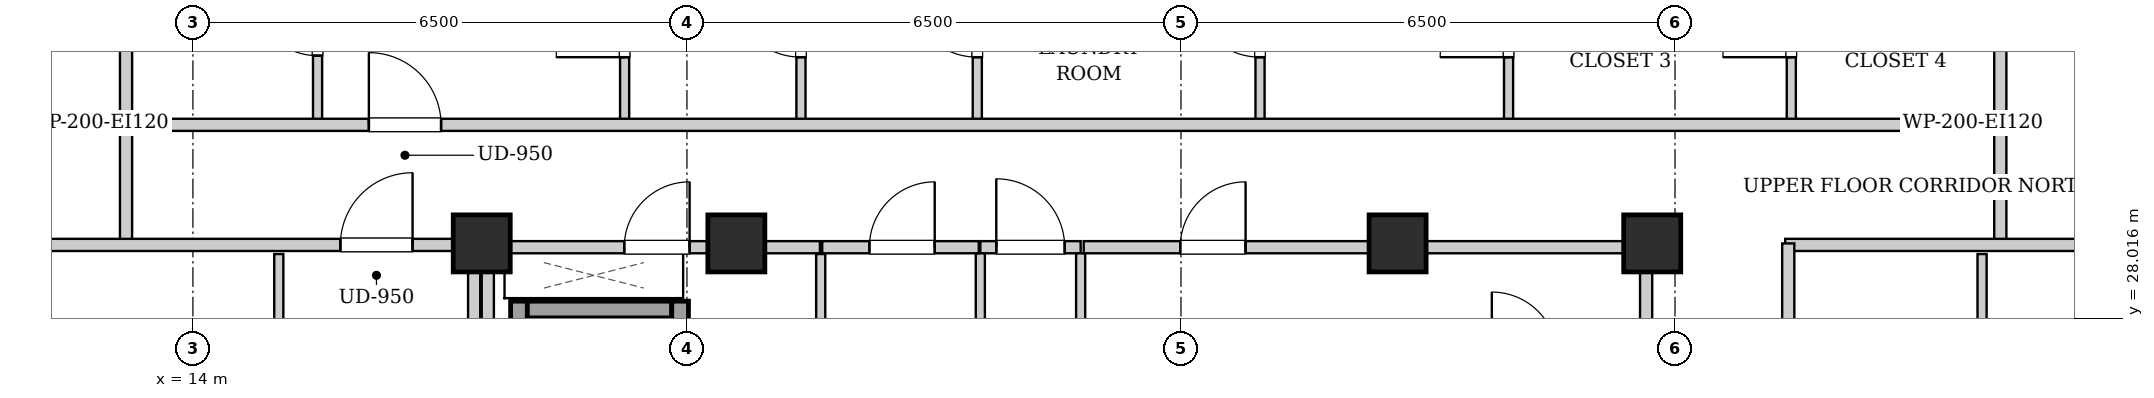
"""IFC4 building model, lengths in metres.
Left out: names, types, materials, properties, quantities, classifications, styles, units other than length and angle.
Written with IfcOpenShell. Run it as: python <this file> out.ifc"""

import sys

from ifc_helpers import new_model, si_unit, direction, frame, frame_2d, origin, origin_2d, place, context, subcontext, project, spatial, rectangle, extrude, element, fill, save


model = new_model("IFC4")
c1 = context("Model", 3, precision=1e-05, world=origin(), true_north=direction((0.0, 1.0)))
c2 = subcontext(c1, "Body", "Model", "MODEL_VIEW")
j1 = project(units=[si_unit("LENGTHUNIT", "METRE"), si_unit("PLANEANGLEUNIT", "RADIAN")], contexts=[c1])
p1 = place(None, origin())
s1 = spatial("IfcSite", under=j1, at=p1, CompositionType="ELEMENT")
p2 = place(p1, origin())
s2 = spatial("IfcBuilding", under=s1, at=p2, CompositionType="ELEMENT")
p3 = place(p2, frame((0.0, 0.0, 241.1)))
s3 = spatial("IfcBuildingStorey", under=s2, at=p3, CompositionType="ELEMENT", Elevation=241.1)
for number, where, z_axis, x_axis in (
    (1, (17.8, 29.0, 0.0), (0.0, 0.0, 1.0), (1.0, 0.0, 0.0)),
    (2, (21.15, 29.0, 0.0), (0.0, 0.0, 1.0), (1.0, 0.0, 0.0)),
    (3, (29.85, 29.0, 0.0), (0.0, 0.0, 1.0), (1.0, 0.0, 0.0)),
    (4, (33.2, 29.0, 0.0), (0.0, 0.0, 1.0), (1.0, 0.0, 0.0)),
):
    element("IfcColumn", number, at=place(p3, frame(where, z_axis=z_axis, x_axis=x_axis)), inside=s3, PredefinedType="COLUMN", context=c2, shape_type="SweptSolid", body=[
        extrude(rectangle(XDim=0.75, YDim=0.75, at=origin_2d()), origin(), (0.0, 0.0, 1.0), 3.4),
    ])
p4 = place(p3, frame((18.29, 24.1, 0.0), z_axis=(0.0, 0.0, 1.0), x_axis=(0.0, 1.0, 0.0)))
e5 = element("IfcWall", 5, at=p4, inside=s3, PredefinedType="SHEAR", context=c2, shape_type="SweptSolid", body=[
    extrude(rectangle(XDim=4.14, YDim=0.22, at=frame_2d((2.07, 0.0))), origin(), (0.0, 0.0, 1.0), 3.14),
])
p5 = place(p3, frame((18.4, 28.13, 0.0), z_axis=(0.0, 0.0, 1.0), x_axis=(1.0, 0.0, 0.0)))
e6 = element("IfcWall", 6, at=p5, inside=s3, PredefinedType="SHEAR", context=c2, shape_type="SweptSolid", body=[
    extrude(rectangle(XDim=1.9, YDim=0.22, at=frame_2d((0.95, 0.0))), origin(), (0.0, 0.0, 1.0), 3.14),
])
p6 = place(p3, frame((20.41, 26.06, 0.0), z_axis=(0.0, 0.0, 1.0), x_axis=(0.0, 1.0, 0.0)))
e7 = element("IfcWall", 7, at=p6, inside=s3, PredefinedType="SHEAR", context=c2, shape_type="SweptSolid", body=[
    extrude(rectangle(XDim=2.18, YDim=0.22, at=frame_2d((1.09, 0.0))), origin(), (0.0, 0.0, 1.0), 3.14),
])
p7 = place(p6, frame((0.54, 0.0, 0.0)))
e8 = element("IfcOpeningElement", 8, at=p7, cuts=e7, PredefinedType="OPENING", context=c2, shape_type="SweptSolid", body=[
    extrude(rectangle(XDim=1.1, YDim=2.15, at=frame_2d((0.55, 1.075))), frame((0.0, 0.12, 0.0), z_axis=(0.0, -1.0, 0.0), x_axis=(1.0, 0.0, 0.0)), (0.0, 0.0, 1.0), 0.24),
])
for number, where, z_axis, x_axis in (
    (9, (17.88, 24.12, 0.0), (0.0, 0.0, 1.0), (0.0, 1.0, 0.0)),
    (10, (33.12, 24.12, 0.0), (0.0, 0.0, 1.0), (0.0, 1.0, 0.0)),
):
    element("IfcWall", number, at=place(p3, frame(where, z_axis=z_axis, x_axis=x_axis)), inside=s3, PredefinedType="PARTITIONING", context=c2, shape_type="SweptSolid", body=[
        extrude(rectangle(XDim=4.76, YDim=0.16, at=frame_2d((2.38, 0.0))), origin(), (0.0, 0.0, 1.0), 3.14),
    ])
p8 = place(p3, frame((24.36, 28.95, 0.0), z_axis=(0.0, 0.0, 1.0), x_axis=(1.0, 0.0, 0.0)))
e11 = element("IfcWall", 11, at=p8, inside=s3, PredefinedType="PARTITIONING", context=c2, shape_type="SweptSolid", body=[
    extrude(rectangle(XDim=1.32, YDim=0.16, at=frame_2d((0.66, 0.0))), origin(), (0.0, 0.0, 1.0), 2.668),
])
p9 = place(p8, frame((0.21, 0.0, 0.0)))
e12 = element("IfcOpeningElement", 12, at=p9, cuts=e11, PredefinedType="OPENING", context=c2, shape_type="SweptSolid", body=[
    extrude(rectangle(XDim=0.9, YDim=2.05, at=frame_2d((0.45, 1.025))), frame((0.0, 0.09, 0.0), z_axis=(0.0, -1.0, 0.0), x_axis=(1.0, 0.0, 0.0)), (0.0, 0.0, 1.0), 0.18),
])
p10 = place(p3, frame((17.96, 28.95, 0.0), z_axis=(0.0, 0.0, 1.0), x_axis=(1.0, 0.0, 0.0)))
e13 = element("IfcWall", 13, at=p10, inside=s3, PredefinedType="PARTITIONING", context=c2, shape_type="SweptSolid", body=[
    extrude(rectangle(XDim=4.29, YDim=0.16, at=frame_2d((2.145, 0.0))), origin(), (0.0, 0.0, 1.0), 2.668),
])
p11 = place(p10, frame((1.715, 0.0, 0.0)))
e14 = element("IfcOpeningElement", 14, at=p11, cuts=e13, PredefinedType="OPENING", context=c2, shape_type="SweptSolid", body=[
    extrude(rectangle(XDim=0.86, YDim=2.05, at=frame_2d((0.43, 1.025))), frame((0.0, 0.09, 0.0), z_axis=(0.0, -1.0, 0.0), x_axis=(1.0, 0.0, 0.0)), (0.0, 0.0, 1.0), 0.18),
])
for number, where, z_axis, x_axis in (
    (15, (24.36, 25.0, 0.0), (0.0, 0.0, 1.0), (0.0, 1.0, 0.0)),
    (16, (25.68, 25.0, 0.0), (0.0, 0.0, 1.0), (0.0, 1.0, 0.0)),
):
    element("IfcWall", number, at=place(p3, frame(where, z_axis=z_axis, x_axis=x_axis)), inside=s3, PredefinedType="PARTITIONING", context=c2, shape_type="SweptSolid", body=[
        extrude(rectangle(XDim=3.87, YDim=0.12, at=frame_2d((1.935, 0.0))), origin(), (0.0, 0.0, 1.0), 3.14),
    ])
p12 = place(p3, frame((22.26, 25.0, 0.0), z_axis=(0.0, 0.0, 1.0), x_axis=(0.0, 1.0, 0.0)))
e17 = element("IfcWall", 17, at=p12, inside=s3, PredefinedType="PARTITIONING", context=c2, shape_type="SweptSolid", body=[
    extrude(rectangle(XDim=3.86, YDim=0.12, at=frame_2d((1.93, 0.0))), origin(), (0.0, 0.0, 1.0), 3.14),
])
p13 = place(p3, frame((22.28, 28.95, 0.0), z_axis=(0.0, 0.0, 1.0), x_axis=(1.0, 0.0, 0.0)))
e18 = element("IfcWall", 18, at=p13, inside=s3, PredefinedType="PARTITIONING", context=c2, shape_type="SweptSolid", body=[
    extrude(rectangle(XDim=2.06, YDim=0.16, at=frame_2d((1.03, 0.0))), origin(), (0.0, 0.0, 1.0), 2.668),
])
p14 = place(p13, frame((0.62, 0.0, 0.0)))
e19 = element("IfcOpeningElement", 19, at=p14, cuts=e18, PredefinedType="OPENING", context=c2, shape_type="SweptSolid", body=[
    extrude(rectangle(XDim=0.86, YDim=2.05, at=frame_2d((0.43, 1.025))), frame((0.0, 0.09, 0.0), z_axis=(0.0, -1.0, 0.0), x_axis=(1.0, 0.0, 0.0)), (0.0, 0.0, 1.0), 0.18),
])
p15 = place(p3, frame((25.72, 28.95, 0.0), z_axis=(0.0, 0.0, 1.0), x_axis=(1.0, 0.0, 0.0)))
e20 = element("IfcWall", 20, at=p15, inside=s3, PredefinedType="PARTITIONING", context=c2, shape_type="SweptSolid", body=[
    extrude(rectangle(XDim=7.32, YDim=0.16, at=frame_2d((3.66, 0.0))), origin(), (0.0, 0.0, 1.0), 2.668),
])
p16 = place(p15, frame((1.27, 0.0, 0.0)))
e21 = element("IfcOpeningElement", 21, at=p16, cuts=e20, PredefinedType="OPENING", context=c2, shape_type="SweptSolid", body=[
    extrude(rectangle(XDim=0.86, YDim=2.05, at=frame_2d((0.43, 1.025))), frame((0.0, 0.09, 0.0), z_axis=(0.0, -1.0, 0.0), x_axis=(1.0, 0.0, 0.0)), (0.0, 0.0, 1.0), 0.18),
])
for number, where, z_axis, x_axis in (
    (22, (13.12, 28.98, 0.0), (0.0, 0.0, 1.0), (0.0, 1.0, 0.0)),
    (23, (37.78, 28.98, 0.0), (0.0, 0.0, 1.0), (0.0, 1.0, 0.0)),
):
    element("IfcWall", number, at=place(p3, frame(where, z_axis=z_axis, x_axis=x_axis)), inside=s3, PredefinedType="PARTITIONING", context=c2, shape_type="SweptSolid", body=[
        extrude(rectangle(XDim=1.58, YDim=0.16, at=frame_2d((0.79, 0.0))), origin(), (0.0, 0.0, 1.0), 3.14),
    ])
p17 = place(p3, frame((34.95, 28.98, 0.0), z_axis=(0.0, 0.0, 1.0), x_axis=(1.0, 0.0, 0.0)))
e24 = element("IfcWall", 24, at=p17, inside=s3, PredefinedType="PARTITIONING", context=c2, shape_type="SweptSolid", body=[
    extrude(rectangle(XDim=5.07, YDim=0.16, at=frame_2d((2.535, 0.0))), origin(), (0.0, 0.0, 1.0), 2.668),
])
for number, where, z_axis, x_axis in (
    (25, (13.12, 30.6, 0.0), (0.0, 0.0, 1.0), (0.0, 1.0, 0.0)),
    (26, (37.78, 30.6, 0.0), (0.0, 0.0, 1.0), (0.0, 1.0, 0.0)),
):
    element("IfcWall", number, at=place(p3, frame(where, z_axis=z_axis, x_axis=x_axis)), inside=s3, PredefinedType="PARTITIONING", context=c2, shape_type="SweptSolid", body=[
        extrude(rectangle(XDim=2.66, YDim=0.16, at=frame_2d((1.33, 0.0))), origin(), (0.0, 0.0, 1.0), 3.14),
    ])
p18 = place(p3, frame((15.64, 30.6, 0.0), z_axis=(0.0, 0.0, 1.0), x_axis=(0.0, 1.0, 0.0)))
e27 = element("IfcWall", 27, at=p18, inside=s3, PredefinedType="PARTITIONING", context=c2, shape_type="SweptSolid", body=[
    extrude(rectangle(XDim=2.6, YDim=0.12, at=frame_2d((1.3, 0.0))), origin(), (0.0, 0.0, 1.0), 3.14),
])
p19 = place(p18, frame((0.87, 0.0, 0.0)))
e28 = element("IfcOpeningElement", 28, at=p19, cuts=e27, PredefinedType="OPENING", context=c2, shape_type="SweptSolid", body=[
    extrude(rectangle(XDim=0.86, YDim=2.05, at=frame_2d((0.43, 1.025))), frame((0.0, 0.07, 0.0), z_axis=(0.0, -1.0, 0.0), x_axis=(1.0, 0.0, 0.0)), (0.0, 0.0, 1.0), 0.14),
])
p20 = place(p3, frame((19.68, 30.6, 0.0), z_axis=(0.0, 0.0, 1.0), x_axis=(0.0, 1.0, 0.0)))
e29 = element("IfcWall", 29, at=p20, inside=s3, PredefinedType="PARTITIONING", context=c2, shape_type="SweptSolid", body=[
    extrude(rectangle(XDim=2.6, YDim=0.12, at=frame_2d((1.3, 0.0))), origin(), (0.0, 0.0, 1.0), 3.14),
])
p21 = place(p20, frame((0.85, 0.0, 0.0)))
e30 = element("IfcOpeningElement", 30, at=p21, cuts=e29, PredefinedType="OPENING", context=c2, shape_type="SweptSolid", body=[
    extrude(rectangle(XDim=0.9, YDim=2.05, at=frame_2d((0.45, 1.025))), frame((0.0, 0.07, 0.0), z_axis=(0.0, -1.0, 0.0), x_axis=(1.0, 0.0, 0.0)), (0.0, 0.0, 1.0), 0.14),
])
p22 = place(p3, frame((22.0, 30.6, 0.0), z_axis=(0.0, 0.0, 1.0), x_axis=(0.0, 1.0, 0.0)))
e31 = element("IfcWall", 31, at=p22, inside=s3, PredefinedType="PARTITIONING", context=c2, shape_type="SweptSolid", body=[
    extrude(rectangle(XDim=2.6, YDim=0.12, at=frame_2d((1.3, 0.0))), origin(), (0.0, 0.0, 1.0), 3.14),
])
p23 = place(p22, frame((0.85, 0.0, 0.0)))
e32 = element("IfcOpeningElement", 32, at=p23, cuts=e31, PredefinedType="OPENING", context=c2, shape_type="SweptSolid", body=[
    extrude(rectangle(XDim=0.9, YDim=2.05, at=frame_2d((0.45, 1.025))), frame((0.0, 0.07, 0.0), z_axis=(0.0, -1.0, 0.0), x_axis=(1.0, 0.0, 0.0)), (0.0, 0.0, 1.0), 0.14),
])
p24 = place(p3, frame((24.32, 30.6, 0.0), z_axis=(0.0, 0.0, 1.0), x_axis=(0.0, 1.0, 0.0)))
e33 = element("IfcWall", 33, at=p24, inside=s3, PredefinedType="PARTITIONING", context=c2, shape_type="SweptSolid", body=[
    extrude(rectangle(XDim=2.6, YDim=0.12, at=frame_2d((1.3, 0.0))), origin(), (0.0, 0.0, 1.0), 3.14),
])
p25 = place(p24, frame((0.85, 0.0, 0.0)))
e34 = element("IfcOpeningElement", 34, at=p25, cuts=e33, PredefinedType="OPENING", context=c2, shape_type="SweptSolid", body=[
    extrude(rectangle(XDim=0.9, YDim=2.05, at=frame_2d((0.45, 1.025))), frame((0.0, 0.07, 0.0), z_axis=(0.0, -1.0, 0.0), x_axis=(1.0, 0.0, 0.0)), (0.0, 0.0, 1.0), 0.14),
])
p26 = place(p3, frame((28.04, 30.6, 0.0), z_axis=(0.0, 0.0, 1.0), x_axis=(0.0, 1.0, 0.0)))
e35 = element("IfcWall", 35, at=p26, inside=s3, PredefinedType="PARTITIONING", context=c2, shape_type="SweptSolid", body=[
    extrude(rectangle(XDim=2.6, YDim=0.12, at=frame_2d((1.3, 0.0))), origin(), (0.0, 0.0, 1.0), 3.14),
])
p27 = place(p26, frame((0.85, 0.0, 0.0)))
e36 = element("IfcOpeningElement", 36, at=p27, cuts=e35, PredefinedType="OPENING", context=c2, shape_type="SweptSolid", body=[
    extrude(rectangle(XDim=0.9, YDim=2.05, at=frame_2d((0.45, 1.025))), frame((0.0, 0.07, 0.0), z_axis=(0.0, -1.0, 0.0), x_axis=(1.0, 0.0, 0.0)), (0.0, 0.0, 1.0), 0.14),
])
p28 = place(p3, frame((31.31, 30.6, 0.0), z_axis=(0.0, 0.0, 1.0), x_axis=(0.0, 1.0, 0.0)))
e37 = element("IfcWall", 37, at=p28, inside=s3, PredefinedType="PARTITIONING", context=c2, shape_type="SweptSolid", body=[
    extrude(rectangle(XDim=2.6, YDim=0.12, at=frame_2d((1.3, 0.0))), origin(), (0.0, 0.0, 1.0), 3.14),
])
p29 = place(p28, frame((0.85, 0.0, 0.0)))
e38 = element("IfcOpeningElement", 38, at=p29, cuts=e37, PredefinedType="OPENING", context=c2, shape_type="SweptSolid", body=[
    extrude(rectangle(XDim=0.9, YDim=2.05, at=frame_2d((0.45, 1.025))), frame((0.0, 0.07, 0.0), z_axis=(0.0, -1.0, 0.0), x_axis=(1.0, 0.0, 0.0)), (0.0, 0.0, 1.0), 0.14),
])
p30 = place(p3, frame((35.03, 30.6, 0.0), z_axis=(0.0, 0.0, 1.0), x_axis=(0.0, 1.0, 0.0)))
e39 = element("IfcWall", 39, at=p30, inside=s3, PredefinedType="PARTITIONING", context=c2, shape_type="SweptSolid", body=[
    extrude(rectangle(XDim=2.6, YDim=0.12, at=frame_2d((1.3, 0.0))), origin(), (0.0, 0.0, 1.0), 3.14),
])
p31 = place(p30, frame((0.85, 0.0, 0.0)))
e40 = element("IfcOpeningElement", 40, at=p31, cuts=e39, PredefinedType="OPENING", context=c2, shape_type="SweptSolid", body=[
    extrude(rectangle(XDim=0.9, YDim=2.05, at=frame_2d((0.45, 1.025))), frame((0.0, 0.07, 0.0), z_axis=(0.0, -1.0, 0.0), x_axis=(1.0, 0.0, 0.0)), (0.0, 0.0, 1.0), 0.14),
])
p32 = place(p3, frame((10.88, 28.98, 0.0), z_axis=(0.0, 0.0, 1.0), x_axis=(1.0, 0.0, 0.0)))
e41 = element("IfcWall", 41, at=p32, inside=s3, PredefinedType="PARTITIONING", context=c2, shape_type="SweptSolid", body=[
    extrude(rectangle(XDim=6.88, YDim=0.16, at=frame_2d((3.44, 0.0))), origin(), (0.0, 0.0, 1.0), 2.668),
])
p33 = place(p32, frame((5.06, 0.0, 0.0)))
e42 = element("IfcOpeningElement", 42, at=p33, cuts=e41, PredefinedType="OPENING", context=c2, shape_type="SweptSolid", body=[
    extrude(rectangle(XDim=0.95, YDim=2.1, at=frame_2d((0.475, 1.05))), frame((0.0, 0.09, 0.0), z_axis=(0.0, -1.0, 0.0), x_axis=(1.0, 0.0, 0.0)), (0.0, 0.0, 1.0), 0.18),
])
p34 = place(p3, frame((15.13, 24.36, 0.0), z_axis=(0.0, 0.0, 1.0), x_axis=(0.0, 1.0, 0.0)))
e43 = element("IfcWall", 43, at=p34, inside=s3, PredefinedType="PARTITIONING", context=c2, shape_type="SweptSolid", body=[
    extrude(rectangle(XDim=4.5, YDim=0.12, at=frame_2d((2.25, 0.0))), origin(), (0.0, 0.0, 1.0), 3.14),
])
p35 = place(p34, frame((1.8, 0.0, 0.0)))
e44 = element("IfcOpeningElement", 44, at=p35, cuts=e43, PredefinedType="OPENING", context=c2, shape_type="SweptSolid", body=[
    extrude(rectangle(XDim=0.9, YDim=2.05, at=frame_2d((0.45, 1.025))), frame((0.0, 0.07, 0.0), z_axis=(0.0, -1.0, 0.0), x_axis=(1.0, 0.0, 0.0)), (0.0, 0.0, 1.0), 0.14),
])
p36 = place(p3, frame((37.54, 24.552, 0.0), z_axis=(0.0, 0.0, 1.0), x_axis=(0.0, 1.0, 0.0)))
e45 = element("IfcWall", 45, at=p36, inside=s3, PredefinedType="PARTITIONING", context=c2, shape_type="SweptSolid", body=[
    extrude(rectangle(XDim=4.308, YDim=0.12, at=frame_2d((2.154, 0.0))), origin(), (0.0, 0.0, 1.0), 3.14),
])
p37 = place(p36, frame((1.704, 0.0, 0.0)))
e46 = element("IfcOpeningElement", 46, at=p37, cuts=e45, PredefinedType="OPENING", context=c2, shape_type="SweptSolid", body=[
    extrude(rectangle(XDim=0.9, YDim=2.05, at=frame_2d((0.45, 1.025))), frame((0.0, 0.07, 0.0), z_axis=(0.0, -1.0, 0.0), x_axis=(1.0, 0.0, 0.0)), (0.0, 0.0, 1.0), 0.14),
])
p38 = place(p3, frame((13.15, 30.56, 0.0), z_axis=(0.0, 0.0, 1.0), x_axis=(1.0, 0.0, 0.0)))
e47 = element("IfcWall", 47, at=p38, inside=s3, PredefinedType="PARTITIONING", context=c2, shape_type="SweptSolid", body=[
    extrude(rectangle(XDim=24.6, YDim=0.16, at=frame_2d((12.3, 0.0))), origin(), (0.0, 0.0, 1.0), 3.14),
])
p39 = place(p38, frame((3.165, 0.0, 0.0)))
e48 = element("IfcOpeningElement", 48, at=p39, cuts=e47, PredefinedType="OPENING", context=c2, shape_type="SweptSolid", body=[
    extrude(rectangle(XDim=0.95, YDim=2.1, at=frame_2d((0.475, 1.05))), frame((0.0, 0.09, 0.0), z_axis=(0.0, -1.0, 0.0), x_axis=(1.0, 0.0, 0.0)), (0.0, 0.0, 1.0), 0.18),
])
p40 = place(p3, frame((17.7, 15.02, 0.0), z_axis=(0.0, 0.0, 1.0), x_axis=(0.0, 1.0, 0.0)))
e49 = element("IfcWall", 49, at=p40, inside=s3, PredefinedType="PARTITIONING", context=c2, shape_type="SweptSolid", body=[
    extrude(rectangle(XDim=13.98, YDim=0.16, at=frame_2d((6.99, 0.0))), origin(), (0.0, 0.0, 1.0), 3.14),
])
p41 = place(p3, frame((34.99, 15.07, 0.0), z_axis=(0.0, 0.0, 1.0), x_axis=(0.0, 1.0, 0.0)))
e50 = element("IfcWall", 50, at=p41, inside=s3, PredefinedType="PARTITIONING", context=c2, shape_type="SweptSolid", body=[
    extrude(rectangle(XDim=13.93, YDim=0.16, at=frame_2d((6.965, 0.0))), origin(), (0.0, 0.0, 1.0), 3.14),
])
p42 = place(p41, frame((4.385, 0.0, 0.0)))
e51 = element("IfcOpeningElement", 51, at=p42, cuts=e50, PredefinedType="OPENING", context=c2, shape_type="SweptSolid", body=[
    extrude(rectangle(XDim=0.95, YDim=2.1, at=frame_2d((0.475, 1.05))), frame((0.0, 0.09, 0.0), z_axis=(0.0, -1.0, 0.0), x_axis=(1.0, 0.0, 0.0)), (0.0, 0.0, 1.0), 0.18),
])
p43 = place(p9, origin())
e52 = element("IfcDoor", 52, at=p43, inside=s3, OperationType="SINGLE_SWING_LEFT", PredefinedType="DOOR", context=c2, shape_type="SweptSolid", body=[
    extrude(rectangle(XDim=0.9, YDim=2.05, at=frame_2d((0.45, 1.025))), frame((0.0, 0.025, 0.0), z_axis=(0.0, -1.0, 0.0), x_axis=(1.0, 0.0, 0.0)), (0.0, 0.0, 1.0), 0.05),
])
fill(e12, e52)
p44 = place(p11, origin())
e53 = element("IfcDoor", 53, at=p44, inside=s3, OperationType="SINGLE_SWING_RIGHT", PredefinedType="DOOR", context=c2, shape_type="SweptSolid", body=[
    extrude(rectangle(XDim=0.86, YDim=2.05, at=frame_2d((0.43, 1.025))), frame((0.0, 0.025, 0.0), z_axis=(0.0, -1.0, 0.0), x_axis=(1.0, 0.0, 0.0)), (0.0, 0.0, 1.0), 0.05),
])
fill(e14, e53)
p45 = place(p14, origin())
e54 = element("IfcDoor", 54, at=p45, inside=s3, OperationType="SINGLE_SWING_RIGHT", PredefinedType="DOOR", context=c2, shape_type="SweptSolid", body=[
    extrude(rectangle(XDim=0.86, YDim=2.05, at=frame_2d((0.43, 1.025))), frame((0.0, 0.025, 0.0), z_axis=(0.0, -1.0, 0.0), x_axis=(1.0, 0.0, 0.0)), (0.0, 0.0, 1.0), 0.05),
])
fill(e19, e54)
p46 = place(p16, origin())
e55 = element("IfcDoor", 55, at=p46, inside=s3, OperationType="SINGLE_SWING_RIGHT", PredefinedType="DOOR", context=c2, shape_type="SweptSolid", body=[
    extrude(rectangle(XDim=0.86, YDim=2.05, at=frame_2d((0.43, 1.025))), frame((0.0, 0.025, 0.0), z_axis=(0.0, -1.0, 0.0), x_axis=(1.0, 0.0, 0.0)), (0.0, 0.0, 1.0), 0.05),
])
fill(e21, e55)
p47 = place(p19, origin())
e56 = element("IfcDoor", 56, at=p47, inside=s3, OperationType="SINGLE_SWING_RIGHT", PredefinedType="DOOR", context=c2, shape_type="SweptSolid", body=[
    extrude(rectangle(XDim=0.86, YDim=2.05, at=frame_2d((0.43, 1.025))), frame((0.0, 0.025, 0.0), z_axis=(0.0, -1.0, 0.0), x_axis=(1.0, 0.0, 0.0)), (0.0, 0.0, 1.0), 0.05),
])
fill(e28, e56)
p48 = place(p21, origin())
e57 = element("IfcDoor", 57, at=p48, inside=s3, OperationType="SINGLE_SWING_LEFT", PredefinedType="DOOR", context=c2, shape_type="SweptSolid", body=[
    extrude(rectangle(XDim=0.9, YDim=2.05, at=frame_2d((0.45, 1.025))), frame((0.0, 0.025, 0.0), z_axis=(0.0, -1.0, 0.0), x_axis=(1.0, 0.0, 0.0)), (0.0, 0.0, 1.0), 0.05),
])
fill(e30, e57)
p49 = place(p23, origin())
e58 = element("IfcDoor", 58, at=p49, inside=s3, OperationType="SINGLE_SWING_RIGHT", PredefinedType="DOOR", context=c2, shape_type="SweptSolid", body=[
    extrude(rectangle(XDim=0.9, YDim=2.05, at=frame_2d((0.45, 1.025))), frame((0.0, 0.025, 0.0), z_axis=(0.0, -1.0, 0.0), x_axis=(1.0, 0.0, 0.0)), (0.0, 0.0, 1.0), 0.05),
])
fill(e32, e58)
p50 = place(p25, origin())
e59 = element("IfcDoor", 59, at=p50, inside=s3, OperationType="SINGLE_SWING_RIGHT", PredefinedType="DOOR", context=c2, shape_type="SweptSolid", body=[
    extrude(rectangle(XDim=0.9, YDim=2.05, at=frame_2d((0.45, 1.025))), frame((0.0, 0.025, 0.0), z_axis=(0.0, -1.0, 0.0), x_axis=(1.0, 0.0, 0.0)), (0.0, 0.0, 1.0), 0.05),
])
fill(e34, e59)
p51 = place(p27, origin())
e60 = element("IfcDoor", 60, at=p51, inside=s3, OperationType="SINGLE_SWING_RIGHT", PredefinedType="DOOR", context=c2, shape_type="SweptSolid", body=[
    extrude(rectangle(XDim=0.9, YDim=2.05, at=frame_2d((0.45, 1.025))), frame((0.0, 0.025, 0.0), z_axis=(0.0, -1.0, 0.0), x_axis=(1.0, 0.0, 0.0)), (0.0, 0.0, 1.0), 0.05),
])
fill(e36, e60)
p52 = place(p29, origin())
e61 = element("IfcDoor", 61, at=p52, inside=s3, OperationType="SINGLE_SWING_LEFT", PredefinedType="DOOR", context=c2, shape_type="SweptSolid", body=[
    extrude(rectangle(XDim=0.9, YDim=2.05, at=frame_2d((0.45, 1.025))), frame((0.0, 0.025, 0.0), z_axis=(0.0, -1.0, 0.0), x_axis=(1.0, 0.0, 0.0)), (0.0, 0.0, 1.0), 0.05),
])
fill(e38, e61)
p53 = place(p31, origin())
e62 = element("IfcDoor", 62, at=p53, inside=s3, OperationType="SINGLE_SWING_LEFT", PredefinedType="DOOR", context=c2, shape_type="SweptSolid", body=[
    extrude(rectangle(XDim=0.9, YDim=2.05, at=frame_2d((0.45, 1.025))), frame((0.0, 0.025, 0.0), z_axis=(0.0, -1.0, 0.0), x_axis=(1.0, 0.0, 0.0)), (0.0, 0.0, 1.0), 0.05),
])
fill(e40, e62)
p54 = place(p33, origin())
e63 = element("IfcDoor", 63, at=p54, inside=s3, OperationType="SINGLE_SWING_RIGHT", PredefinedType="DOOR", context=c2, shape_type="SweptSolid", body=[
    extrude(rectangle(XDim=0.95, YDim=2.1, at=frame_2d((0.475, 1.05))), frame((0.0, 0.025, 0.0), z_axis=(0.0, -1.0, 0.0), x_axis=(1.0, 0.0, 0.0)), (0.0, 0.0, 1.0), 0.05),
])
fill(e42, e63)
p55 = place(p39, origin())
e64 = element("IfcDoor", 64, at=p55, inside=s3, OperationType="SINGLE_SWING_LEFT", PredefinedType="DOOR", context=c2, shape_type="SweptSolid", body=[
    extrude(rectangle(XDim=0.95, YDim=2.1, at=frame_2d((0.475, 1.05))), frame((0.0, 0.025, 0.0), z_axis=(0.0, -1.0, 0.0), x_axis=(1.0, 0.0, 0.0)), (0.0, 0.0, 1.0), 0.05),
])
fill(e48, e64)
save(model, sys.argv[1])
